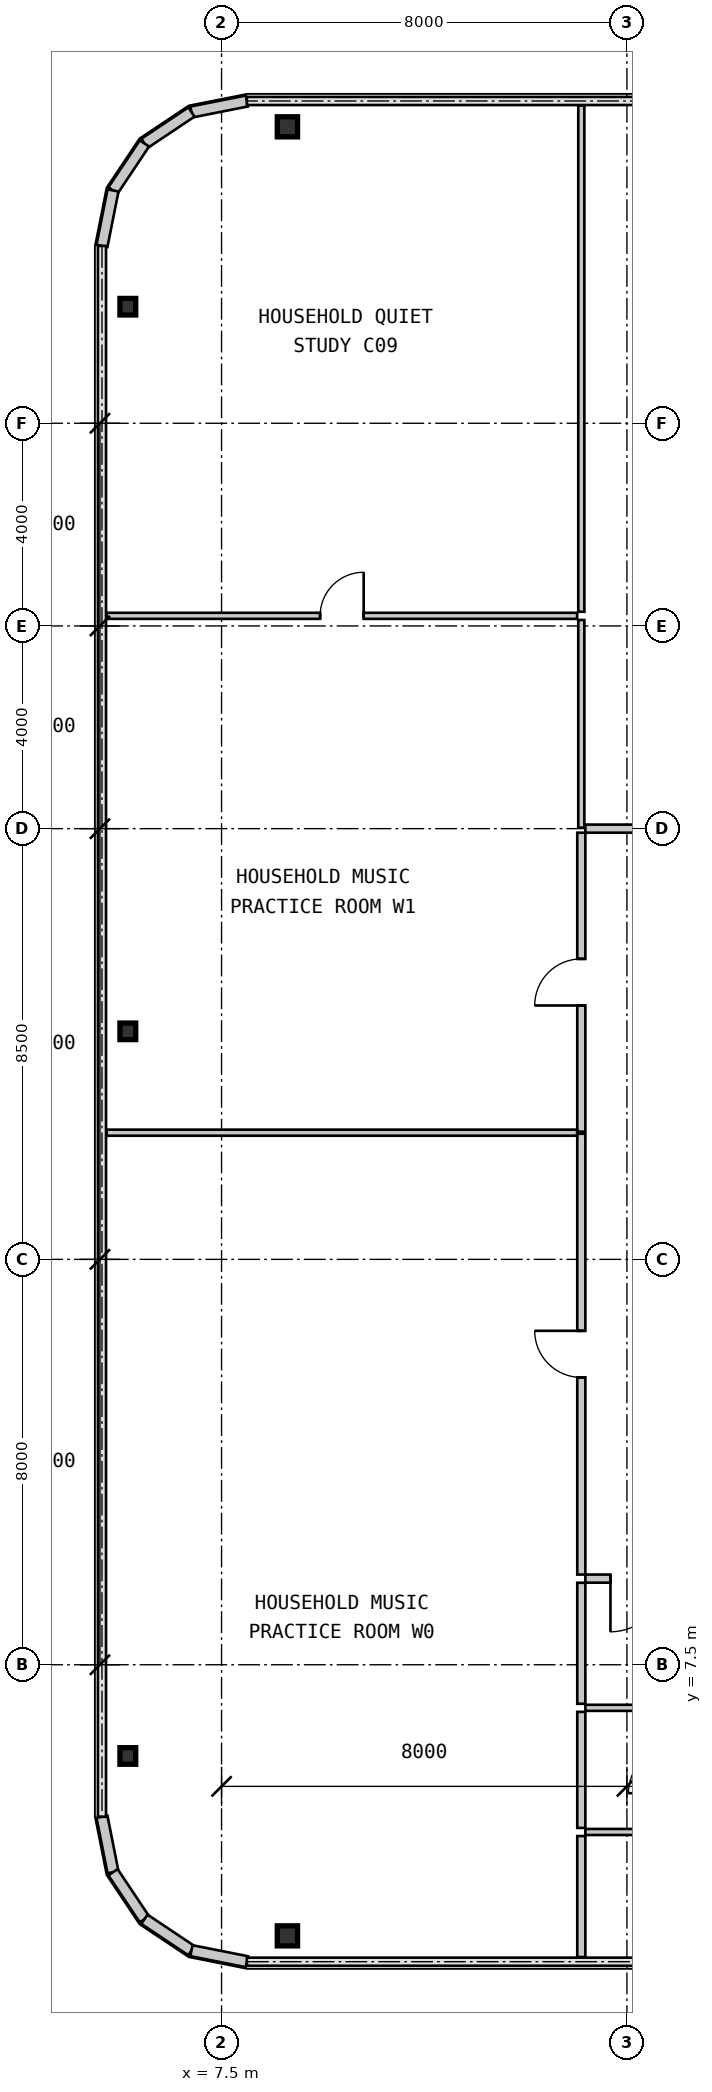
"""IFC4 building model, lengths in metres.
Left out: names, types, materials, properties, quantities, classifications, styles, units other than length and angle.
Written with IfcOpenShell. Run it as: python <this file> out.ifc"""

import sys

from ifc_helpers import new_model, si_unit, direction, frame, frame_2d, origin, origin_2d, place, context, subcontext, project, spatial, rectangle, i_section, extrude, source, transform, mapped, element, fill, save


model = new_model("IFC4")
c1 = context("Model", 3, precision=1e-05, world=origin(), true_north=direction((0.0, 1.0)))
c2 = subcontext(c1, "Body", "Model", "MODEL_VIEW")
j1 = project(units=[si_unit("LENGTHUNIT", "METRE"), si_unit("PLANEANGLEUNIT", "RADIAN")], contexts=[c1])
p1 = place(None, origin())
s1 = spatial("IfcSite", under=j1, at=p1, CompositionType="ELEMENT")
p2 = place(p1, origin())
s2 = spatial("IfcBuilding", under=s1, at=p2, CompositionType="ELEMENT")
p3 = place(p2, frame((0.0, 0.0, 51.45)))
s3 = spatial("IfcBuildingStorey", under=s2, at=p3, CompositionType="ELEMENT", Elevation=51.45)
m1 = source(origin(), c2, "Body", "SweptSolid", [
    extrude(i_section(OverallWidth=0.4, OverallDepth=0.396, WebThickness=0.022, FlangeThickness=0.034, at=origin_2d()), origin(), (0.0, 0.0, 1.0), 3.15),
])
for number, where, z_axis, x_axis in (
    (1, (8.8, 2.15, 0.0), (0.0, 0.0, 1.0), (1.0, 0.0, 0.0)),
    (2, (8.8, 37.85, 0.0), (0.0, 0.0, 1.0), (1.0, 0.0, 0.0)),
):
    element("IfcColumn", number, at=place(p3, frame(where, z_axis=z_axis, x_axis=x_axis)), inside=s3, PredefinedType="COLUMN", context=c2, shape_type="MappedRepresentation", body=[
        mapped(m1, transform((0.0, 0.0, 0.0), scale=1.0)),
    ])
m2 = source(origin(), c2, "Body", "SweptSolid", [
    extrude(i_section(OverallWidth=0.311, OverallDepth=0.327, WebThickness=0.016, FlangeThickness=0.025, at=origin_2d()), origin(), (0.0, 0.0, 1.0), 3.15),
])
for number, where, z_axis, x_axis in (
    (3, (5.65, 5.7, 0.0), (0.0, 0.0, 1.0), (1.0, 0.0, 0.0)),
    (4, (5.65, 20.0, 0.0), (0.0, 0.0, 1.0), (1.0, 0.0, 0.0)),
    (5, (5.65, 34.3, 0.0), (0.0, 0.0, 1.0), (1.0, 0.0, 0.0)),
):
    element("IfcColumn", number, at=place(p3, frame(where, z_axis=z_axis, x_axis=x_axis)), inside=s3, PredefinedType="COLUMN", context=c2, shape_type="MappedRepresentation", body=[
        mapped(m2, transform((0.0, 0.0, 0.0), scale=1.0)),
    ])
m3 = source(origin(), c2, "Body", "SweptSolid", [
    extrude(rectangle(XDim=1.116, YDim=0.22, at=frame_2d((0.558, 0.0))), origin(), (0.0, 0.0, 1.0), 2.93),
])
for number, where, z_axis, x_axis in (
    (6, (8.0, 38.36, 0.0), (0.0, 0.0, 1.0), (-0.981, -0.195, 0.0)),
    (7, (6.906, 38.142, 0.0), (0.0, 0.0, 1.0), (-0.831, -0.556, 0.0)),
    (8, (5.978, 37.522, 0.0), (0.0, 0.0, 1.0), (-0.556, -0.831, 0.0)),
    (9, (5.358, 36.594, 0.0), (0.0, 0.0, 1.0), (-0.195, -0.981, 0.0)),
    (10, (5.14, 4.5, 0.0), (0.0, 0.0, 1.0), (0.195, -0.981, 0.0)),
    (11, (5.358, 3.406, 0.0), (0.0, 0.0, 1.0), (0.556, -0.831, 0.0)),
    (12, (5.978, 2.478, 0.0), (0.0, 0.0, 1.0), (0.831, -0.556, 0.0)),
    (13, (6.906, 1.858, 0.0), (0.0, 0.0, 1.0), (0.981, -0.195, 0.0)),
):
    element("IfcWall", number, at=place(p3, frame(where, z_axis=z_axis, x_axis=x_axis)), inside=s3, PredefinedType="SOLIDWALL", context=c2, shape_type="MappedRepresentation", body=[
        mapped(m3, transform((0.0, 0.0, 0.0), scale=1.0)),
    ])
m4 = source(origin(), c2, "Body", "SweptSolid", [
    extrude(rectangle(XDim=2.04, YDim=0.16, at=frame_2d((1.02, 0.0))), origin(), (0.0, 0.0, 1.0), 2.93),
])
p4 = place(p3, frame((16.72, 9.2, 0.0), z_axis=(0.0, 0.0, 1.0), x_axis=(-1.0, 0.0, 0.0)))
e14 = element("IfcWall", 14, at=p4, inside=s3, PredefinedType="PARTITIONING", context=c2, shape_type="MappedRepresentation", body=[
    mapped(m4, transform((0.0, 0.0, 0.0), scale=1.0)),
])
m5 = source(origin(), c2, "Body", "SweptSolid", [
    extrude(rectangle(XDim=1.05, YDim=2.1, at=frame_2d((0.525, 1.05))), frame((0.0, 0.09, 0.0), z_axis=(0.0, -1.0, 0.0), x_axis=(1.0, 0.0, 0.0)), (0.0, 0.0, 1.0), 0.18),
])
p5 = place(p4, frame((0.495, 0.0, 0.0)))
e15 = element("IfcOpeningElement", 15, at=p5, cuts=e14, PredefinedType="OPENING", context=c2, shape_type="MappedRepresentation", body=[
    mapped(m5, transform((0.0, 0.0, 0.0), scale=1.0)),
])
m6 = source(origin(), c2, "Body", "SweptSolid", [
    extrude(rectangle(XDim=8.7, YDim=0.16, at=frame_2d((4.35, 0.0))), origin(), (0.0, 0.0, 1.0), 2.93),
])
p6 = place(p3, frame((14.6, 9.28, 0.0), z_axis=(0.0, 0.0, 1.0), x_axis=(0.0, 1.0, 0.0)))
e16 = element("IfcWall", 16, at=p6, inside=s3, PredefinedType="PARTITIONING", context=c2, shape_type="MappedRepresentation", body=[
    mapped(m6, transform((0.0, 0.0, 0.0), scale=1.0)),
])
m7 = source(origin(), c2, "Body", "SweptSolid", [
    extrude(rectangle(XDim=0.92, YDim=2.1, at=frame_2d((0.46, 1.05))), frame((0.0, 0.09, 0.0), z_axis=(0.0, -1.0, 0.0), x_axis=(1.0, 0.0, 0.0)), (0.0, 0.0, 1.0), 0.18),
])
p7 = place(p6, frame((3.89, 0.0, 0.0)))
e17 = element("IfcOpeningElement", 17, at=p7, cuts=e16, PredefinedType="OPENING", context=c2, shape_type="MappedRepresentation", body=[
    mapped(m7, transform((0.0, 0.0, 0.0), scale=1.0)),
])
m8 = source(origin(), c2, "Body", "SweptSolid", [
    extrude(rectangle(XDim=5.9, YDim=0.16, at=frame_2d((2.95, 0.0))), origin(), (0.0, 0.0, 1.0), 2.93),
])
p8 = place(p3, frame((14.6, 18.02, 0.0), z_axis=(0.0, 0.0, 1.0), x_axis=(0.0, 1.0, 0.0)))
e18 = element("IfcWall", 18, at=p8, inside=s3, PredefinedType="PARTITIONING", context=c2, shape_type="MappedRepresentation", body=[
    mapped(m8, transform((0.0, 0.0, 0.0), scale=1.0)),
])
p9 = place(p8, frame((2.49, 0.0, 0.0)))
e19 = element("IfcOpeningElement", 19, at=p9, cuts=e18, PredefinedType="OPENING", context=c2, shape_type="MappedRepresentation", body=[
    mapped(m7, transform((0.0, 0.0, 0.0), scale=1.0)),
])
m9 = source(origin(), c2, "Body", "SweptSolid", [
    extrude(rectangle(XDim=4.13, YDim=0.16, at=frame_2d((2.065, 0.0))), origin(), (0.0, 0.0, 1.0), 2.93),
])
p10 = place(p3, frame((14.68, 24.0, 0.0), z_axis=(0.0, 0.0, 1.0), x_axis=(1.0, 0.0, 0.0)))
e20 = element("IfcWall", 20, at=p10, inside=s3, PredefinedType="PARTITIONING", context=c2, shape_type="MappedRepresentation", body=[
    mapped(m9, transform((0.0, 0.0, 0.0), scale=1.0)),
])
p11 = place(p10, frame((1.69, 0.0, 0.0)))
e21 = element("IfcOpeningElement", 21, at=p11, cuts=e20, PredefinedType="OPENING", context=c2, shape_type="MappedRepresentation", body=[
    mapped(m7, transform((0.0, 0.0, 0.0), scale=1.0)),
])
m10 = source(origin(), c2, "Body", "SweptSolid", [
    extrude(rectangle(XDim=1.75, YDim=0.12, at=frame_2d((0.875, 0.0))), origin(), (0.0, 0.0, 1.0), 2.93),
])
for number, where, z_axis, x_axis in (
    (22, (14.68, 4.2, 0.0), (0.0, 0.0, 1.0), (1.0, 0.0, 0.0)),
    (23, (16.43, 6.65, 0.0), (0.0, 0.0, 1.0), (-1.0, 0.0, 0.0)),
):
    element("IfcWall", number, at=place(p3, frame(where, z_axis=z_axis, x_axis=x_axis)), inside=s3, PredefinedType="PARTITIONING", context=c2, shape_type="MappedRepresentation", body=[
        mapped(m10, transform((0.0, 0.0, 0.0), scale=1.0)),
    ])
m11 = source(origin(), c2, "Body", "SweptSolid", [
    extrude(rectangle(XDim=2.388, YDim=0.16, at=frame_2d((1.194, 0.0))), origin(), (0.0, 0.0, 1.0), 2.93),
])
p12 = place(p3, frame((14.6, 1.732, 0.0), z_axis=(0.0, 0.0, 1.0), x_axis=(0.0, 1.0, 0.0)))
e24 = element("IfcWall", 24, at=p12, inside=s3, PredefinedType="PARTITIONING", context=c2, shape_type="MappedRepresentation", body=[
    mapped(m11, transform((0.0, 0.0, 0.0), scale=1.0)),
])
m12 = source(origin(), c2, "Body", "SweptSolid", [
    extrude(rectangle(XDim=2.388, YDim=0.16, at=frame_2d((1.194, 0.0))), origin(), (0.0, 0.0, 1.0), 2.93),
])
p13 = place(p3, frame((14.6, 6.73, 0.0), z_axis=(0.0, 0.0, 1.0), x_axis=(0.0, 1.0, 0.0)))
e25 = element("IfcWall", 25, at=p13, inside=s3, PredefinedType="PARTITIONING", context=c2, shape_type="MappedRepresentation", body=[
    mapped(m12, transform((0.0, 0.0, 0.0), scale=1.0)),
])
m13 = source(origin(), c2, "Body", "SweptSolid", [
    extrude(rectangle(XDim=2.29, YDim=0.16, at=frame_2d((1.145, 0.0))), origin(), (0.0, 0.0, 1.0), 2.93),
])
p14 = place(p3, frame((14.6, 4.28, 0.0), z_axis=(0.0, 0.0, 1.0), x_axis=(0.0, 1.0, 0.0)))
e26 = element("IfcWall", 26, at=p14, inside=s3, PredefinedType="PARTITIONING", context=c2, shape_type="MappedRepresentation", body=[
    mapped(m13, transform((0.0, 0.0, 0.0), scale=1.0)),
])
m14 = source(origin(), c2, "Body", "SweptSolid", [
    extrude(rectangle(XDim=9.286, YDim=0.12, at=frame_2d((4.643, 0.0))), origin(), (0.0, 0.0, 1.0), 2.93),
])
p15 = place(p3, frame((5.232, 18.0, 0.0), z_axis=(0.0, 0.0, 1.0), x_axis=(1.0, 0.0, 0.0)))
e27 = element("IfcWall", 27, at=p15, inside=s3, PredefinedType="PARTITIONING", context=c2, shape_type="MappedRepresentation", body=[
    mapped(m14, transform((0.0, 0.0, 0.0), scale=1.0)),
])
p16 = place(p3, frame((5.232, 28.2, 0.0), z_axis=(0.0, 0.0, 1.0), x_axis=(1.0, 0.0, 0.0)))
e28 = element("IfcWall", 28, at=p16, inside=s3, PredefinedType="PARTITIONING", context=c2, shape_type="MappedRepresentation", body=[
    mapped(m14, transform((0.0, 0.0, 0.0), scale=1.0)),
])
m15 = source(origin(), c2, "Body", "SweptSolid", [
    extrude(rectangle(XDim=0.86, YDim=2.1, at=frame_2d((0.43, 1.05))), frame((0.0, 0.07, 0.0), z_axis=(0.0, -1.0, 0.0), x_axis=(1.0, 0.0, 0.0)), (0.0, 0.0, 1.0), 0.14),
])
p17 = place(p16, frame((4.213, 0.0, 0.0)))
e29 = element("IfcOpeningElement", 29, at=p17, cuts=e28, PredefinedType="OPENING", context=c2, shape_type="MappedRepresentation", body=[
    mapped(m15, transform((0.0, 0.0, 0.0), scale=1.0)),
])
m16 = source(origin(), c2, "Body", "SweptSolid", [
    extrude(rectangle(XDim=4.098, YDim=0.12, at=frame_2d((2.049, 0.0))), origin(), (0.0, 0.0, 1.0), 2.93),
])
p18 = place(p3, frame((14.6, 28.118, 0.0), z_axis=(0.0, 0.0, 1.0), x_axis=(0.0, -1.0, 0.0)))
e30 = element("IfcWall", 30, at=p18, inside=s3, PredefinedType="PARTITIONING", context=c2, shape_type="MappedRepresentation", body=[
    mapped(m16, transform((0.0, 0.0, 0.0), scale=1.0)),
])
m17 = source(origin(), c2, "Body", "SweptSolid", [
    extrude(rectangle(XDim=9.99, YDim=0.12, at=frame_2d((4.995, 0.0))), origin(), (0.0, 0.0, 1.0), 2.93),
])
p19 = place(p3, frame((14.6, 38.27, 0.0), z_axis=(0.0, 0.0, 1.0), x_axis=(0.0, -1.0, 0.0)))
e31 = element("IfcWall", 31, at=p19, inside=s3, PredefinedType="PARTITIONING", context=c2, shape_type="MappedRepresentation", body=[
    mapped(m17, transform((0.0, 0.0, 0.0), scale=1.0)),
])
m18 = source(origin(), c2, "Body", "SweptSolid", [
    extrude(rectangle(XDim=1.05, YDim=2.1, at=frame_2d((0.525, 1.05))), frame((0.0, 0.025, 0.0), z_axis=(0.0, -1.0, 0.0), x_axis=(1.0, 0.0, 0.0)), (0.0, 0.0, 1.0), 0.05),
])
p20 = place(p5, origin())
e32 = element("IfcDoor", 32, at=p20, inside=s3, OperationType="SINGLE_SWING_RIGHT", PredefinedType="DOOR", context=c2, shape_type="MappedRepresentation", body=[
    mapped(m18, transform((0.0, 0.0, 0.0), scale=1.0)),
])
fill(e15, e32)
m19 = source(origin(), c2, "Body", "SweptSolid", [
    extrude(rectangle(XDim=0.92, YDim=2.1, at=frame_2d((0.46, 1.05))), frame((0.0, 0.025, 0.0), z_axis=(0.0, -1.0, 0.0), x_axis=(1.0, 0.0, 0.0)), (0.0, 0.0, 1.0), 0.05),
])
p21 = place(p7, origin())
e33 = element("IfcDoor", 33, at=p21, inside=s3, OperationType="SINGLE_SWING_RIGHT", PredefinedType="DOOR", context=c2, shape_type="MappedRepresentation", body=[
    mapped(m19, transform((0.0, 0.0, 0.0), scale=1.0)),
])
fill(e17, e33)
p22 = place(p9, origin())
e34 = element("IfcDoor", 34, at=p22, inside=s3, OperationType="SINGLE_SWING_LEFT", PredefinedType="DOOR", context=c2, shape_type="MappedRepresentation", body=[
    mapped(m19, transform((0.0, 0.0, 0.0), scale=1.0)),
])
fill(e19, e34)
m20 = source(origin(), c2, "Body", "SweptSolid", [
    extrude(rectangle(XDim=0.86, YDim=2.1, at=frame_2d((0.43, 1.05))), frame((0.0, 0.025, 0.0), z_axis=(0.0, -1.0, 0.0), x_axis=(1.0, 0.0, 0.0)), (0.0, 0.0, 1.0), 0.05),
])
p23 = place(p17, origin())
e35 = element("IfcDoor", 35, at=p23, inside=s3, OperationType="SINGLE_SWING_RIGHT", PredefinedType="DOOR", context=c2, shape_type="MappedRepresentation", body=[
    mapped(m20, transform((0.0, 0.0, 0.0), scale=1.0)),
])
fill(e29, e35)
save(model, sys.argv[1])
